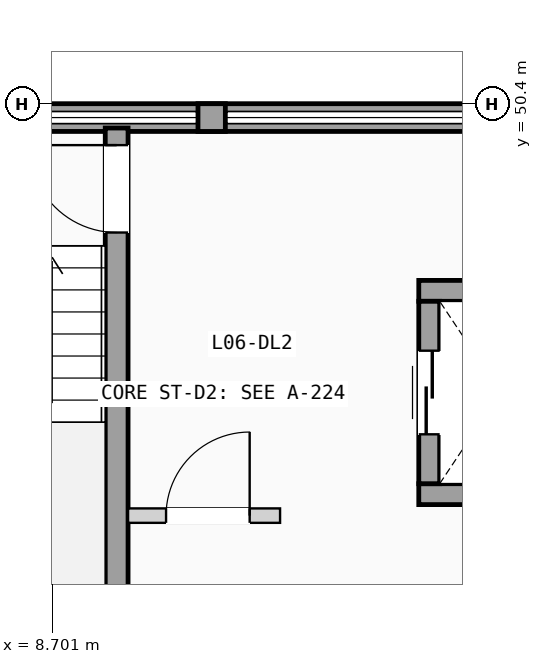
"""IFC4 building model, lengths in metres.
Left out: names, types, materials, properties, quantities, classifications, styles, units other than length and angle.
Written with IfcOpenShell. Run it as: python <this file> out.ifc"""

import sys

from ifc_helpers import new_model, si_unit, direction, frame, frame_2d, origin, place, context, subcontext, project, spatial, rectangle, extrude, element, fill, save


model = new_model("IFC4")
c1 = context("Model", 3, precision=1e-05, world=origin(), true_north=direction((0.0, 1.0)))
c2 = subcontext(c1, "Body", "Model", "MODEL_VIEW")
j1 = project(units=[si_unit("LENGTHUNIT", "METRE"), si_unit("PLANEANGLEUNIT", "RADIAN")], contexts=[c1])
p1 = place(None, origin())
s1 = spatial("IfcSite", under=j1, at=p1, CompositionType="ELEMENT")
p2 = place(p1, origin())
s2 = spatial("IfcBuilding", under=s1, at=p2, CompositionType="ELEMENT")
p3 = place(p2, frame((0.0, 0.0, 21.525)))
s3 = spatial("IfcBuildingStorey", under=s2, at=p3, CompositionType="ELEMENT", Elevation=21.525)
p4 = place(p3, frame((0.0, 50.218, 0.0), z_axis=(0.0, 0.0, 1.0), x_axis=(1.0, 0.0, 0.0)))
e1 = element("IfcWall", 1, at=p4, inside=s3, PredefinedType="SOLIDWALL", context=c2, shape_type="SweptSolid", body=[
    extrude(rectangle(XDim=21.6, YDim=0.365, at=frame_2d((10.8, 0.0))), origin(), (0.0, 0.0, 1.0), 1.11),
])
p5 = place(p3, frame((10.62, 50.218, 1.11), z_axis=(0.0, 0.0, 1.0), x_axis=(1.0, 0.0, 0.0)))
e2 = element("IfcWall", 2, at=p5, inside=s3, PredefinedType="SOLIDWALL", context=c2, shape_type="SweptSolid", body=[
    extrude(rectangle(XDim=0.36, YDim=0.365, at=frame_2d((0.18, 0.0))), origin(), (0.0, 0.0, 1.0), 1.78),
])
p6 = place(p3, frame((9.55, 43.08, 0.0), z_axis=(0.0, 0.0, 1.0), x_axis=(0.0, 1.0, 0.0)))
e3 = element("IfcWall", 3, at=p6, inside=s3, PredefinedType="SHEAR", context=c2, shape_type="SweptSolid", body=[
    extrude(rectangle(XDim=7.0, YDim=0.3, at=frame_2d((3.5, 0.0))), origin(), (0.0, 0.0, 1.0), 2.89),
])
p7 = place(p6, frame((5.625, 0.0, 0.0)))
e4 = element("IfcOpeningElement", 4, at=p7, cuts=e3, PredefinedType="OPENING", context=c2, shape_type="SweptSolid", body=[
    extrude(rectangle(XDim=1.15, YDim=2.12, at=frame_2d((0.575, 1.06))), frame((0.0, 0.16, 0.0), z_axis=(0.0, -1.0, 0.0), x_axis=(1.0, 0.0, 0.0)), (0.0, 0.0, 1.0), 0.32),
])
for number, where, z_axis, x_axis in (
    (5, (13.525, 45.262, 0.0), (0.0, 0.0, 1.0), (1.0, 0.0, 0.0)),
    (6, (13.525, 47.938, 0.0), (0.0, 0.0, 1.0), (1.0, 0.0, 0.0)),
):
    element("IfcWall", number, at=place(p3, frame(where, z_axis=z_axis, x_axis=x_axis)), inside=s3, PredefinedType="SHEAR", context=c2, shape_type="SweptSolid", body=[
        extrude(rectangle(XDim=2.15, YDim=0.275, at=frame_2d((1.075, 0.0))), origin(), (0.0, 0.0, 1.0), 2.89),
    ])
p8 = place(p3, frame((13.663, 45.4, 0.0), z_axis=(0.0, 0.0, 1.0), x_axis=(0.0, 1.0, 0.0)))
e7 = element("IfcWall", 7, at=p8, inside=s3, PredefinedType="SHEAR", context=c2, shape_type="SweptSolid", body=[
    extrude(rectangle(XDim=2.4, YDim=0.275, at=frame_2d((1.2, 0.0))), origin(), (0.0, 0.0, 1.0), 2.89),
])
p9 = place(p8, frame((0.65, 0.0, 0.0)))
e8 = element("IfcOpeningElement", 8, at=p9, cuts=e7, PredefinedType="OPENING", context=c2, shape_type="SweptSolid", body=[
    extrude(rectangle(XDim=1.1, YDim=2.15, at=frame_2d((0.55, 1.075))), frame((0.0, 0.147, 0.0), z_axis=(0.0, -1.0, 0.0), x_axis=(1.0, 0.0, 0.0)), (0.0, 0.0, 1.0), 0.295),
])
p10 = place(p3, frame((9.7, 44.98, 0.0), z_axis=(0.0, 0.0, 1.0), x_axis=(1.0, 0.0, 0.0)))
e9 = element("IfcWall", 9, at=p10, inside=s3, PredefinedType="PARTITIONING", context=c2, shape_type="SweptSolid", body=[
    extrude(rectangle(XDim=2.0, YDim=0.19, at=frame_2d((1.0, 0.0))), origin(), (0.0, 0.0, 1.0), 2.87),
])
p11 = place(p10, frame((0.5, 0.0, 0.0)))
e10 = element("IfcOpeningElement", 10, at=p11, cuts=e9, PredefinedType="OPENING", context=c2, shape_type="SweptSolid", body=[
    extrude(rectangle(XDim=1.1, YDim=2.12, at=frame_2d((0.55, 1.06))), frame((0.0, 0.105, 0.0), z_axis=(0.0, -1.0, 0.0), x_axis=(1.0, 0.0, 0.0)), (0.0, 0.0, 1.0), 0.21),
])
p12 = place(p7, origin())
e11 = element("IfcDoor", 11, at=p12, inside=s3, OperationType="SINGLE_SWING_RIGHT", PredefinedType="DOOR", context=c2, shape_type="SweptSolid", body=[
    extrude(rectangle(XDim=1.15, YDim=2.12, at=frame_2d((0.575, 1.06))), frame((0.0, 0.025, 0.0), z_axis=(0.0, -1.0, 0.0), x_axis=(1.0, 0.0, 0.0)), (0.0, 0.0, 1.0), 0.05),
])
fill(e4, e11)
p13 = place(p9, origin())
e12 = element("IfcDoor", 12, at=p13, inside=s3, OperationType="SLIDING_TO_LEFT", PredefinedType="DOOR", context=c2, shape_type="SweptSolid", body=[
    extrude(rectangle(XDim=1.1, YDim=2.15, at=frame_2d((0.55, 1.075))), frame((0.0, 0.025, 0.0), z_axis=(0.0, -1.0, 0.0), x_axis=(1.0, 0.0, 0.0)), (0.0, 0.0, 1.0), 0.05),
])
fill(e8, e12)
p14 = place(p11, origin())
e13 = element("IfcDoor", 13, at=p14, inside=s3, OperationType="SINGLE_SWING_RIGHT", PredefinedType="DOOR", context=c2, shape_type="SweptSolid", body=[
    extrude(rectangle(XDim=1.1, YDim=2.12, at=frame_2d((0.55, 1.06))), frame((0.0, 0.025, 0.0), z_axis=(0.0, -1.0, 0.0), x_axis=(1.0, 0.0, 0.0)), (0.0, 0.0, 1.0), 0.05),
])
fill(e10, e13)
save(model, sys.argv[1])
